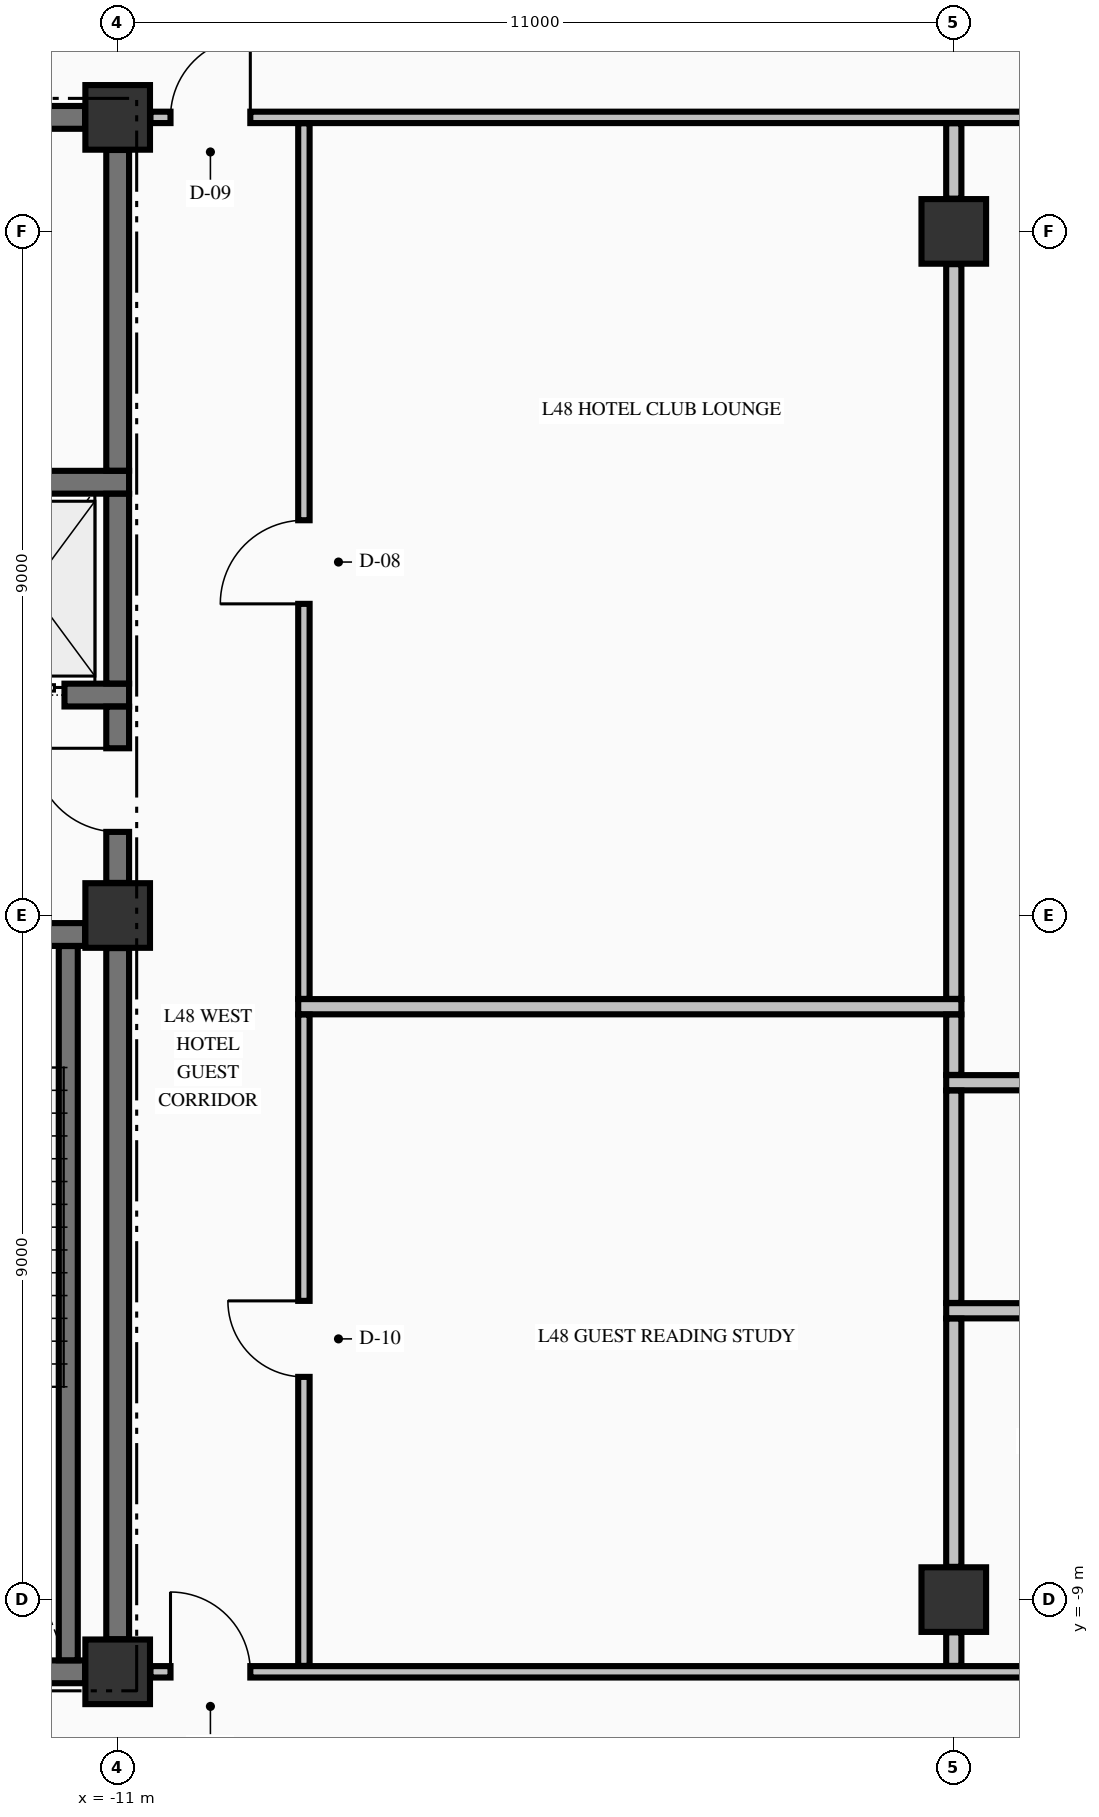
"""IFC4 building model, lengths in metres.
Left out: names, types, materials, properties, quantities, classifications, styles, units other than length and angle.
Written with IfcOpenShell. Run it as: python <this file> out.ifc"""

import sys

from ifc_helpers import new_model, si_unit, direction, frame, frame_2d, origin, origin_2d, place, context, subcontext, project, spatial, rectangle, extrude, element, fill, save


model = new_model("IFC4")
c1 = context("Model", 3, precision=1e-05, world=origin(), true_north=direction((0.0, 1.0)))
c2 = subcontext(c1, "Body", "Model", "MODEL_VIEW")
j1 = project(units=[si_unit("LENGTHUNIT", "METRE"), si_unit("PLANEANGLEUNIT", "RADIAN")], contexts=[c1])
p1 = place(None, origin())
s1 = spatial("IfcSite", under=j1, at=p1, CompositionType="ELEMENT")
p2 = place(p1, origin())
s2 = spatial("IfcBuilding", under=s1, at=p2, CompositionType="ELEMENT")
p3 = place(p2, frame((0.0, 0.0, 186.46)))
s3 = spatial("IfcBuildingStorey", under=s2, at=p3, CompositionType="ELEMENT", Elevation=186.46)
for number, where, z_axis, x_axis in (
    (1, (-11.0, -9.95, -0.425), (0.0, 0.0, 1.0), (1.0, 0.0, 0.0)),
    (2, (-11.0, 0.0, -0.425), (0.0, 0.0, 1.0), (1.0, 0.0, 0.0)),
    (3, (-11.0, 10.5, -0.425), (0.0, 0.0, 1.0), (1.0, 0.0, 0.0)),
    (4, (0.0, -9.0, -0.425), (0.0, 0.0, 1.0), (1.0, 0.0, 0.0)),
    (5, (0.0, 9.0, -0.425), (0.0, 0.0, 1.0), (1.0, 0.0, 0.0)),
):
    element("IfcColumn", number, at=place(p3, frame(where, z_axis=z_axis, x_axis=x_axis)), inside=s3, PredefinedType="COLUMN", context=c2, shape_type="SweptSolid", body=[
        extrude(rectangle(XDim=0.85, YDim=0.85, at=origin_2d()), origin(), (0.0, 0.0, 1.0), 5.0),
    ])
p4 = place(p3, frame((-14.7, -9.95, 0.0), z_axis=(0.0, 0.0, 1.0), x_axis=(1.0, 0.0, 0.0)))
e6 = element("IfcWall", 6, at=p4, inside=s3, PredefinedType="SHEAR", context=c2, shape_type="SweptSolid", body=[
    extrude(rectangle(XDim=3.271, YDim=0.3, at=frame_2d((1.635, 0.0))), origin(), (0.0, 0.0, 1.0), 4.575),
])
p5 = place(p3, frame((-19.571, -0.25, 0.0), z_axis=(0.0, 0.0, 1.0), x_axis=(1.0, 0.0, 0.0)))
e7 = element("IfcWall", 7, at=p5, inside=s3, PredefinedType="SHEAR", context=c2, shape_type="SweptSolid", body=[
    extrude(rectangle(XDim=8.142, YDim=0.3, at=frame_2d((4.071, 0.0))), origin(), (0.0, 0.0, 1.0), 4.575),
])
p6 = place(p5, frame((5.871, 0.0, 0.0)))
e8 = element("IfcOpeningElement", 8, at=p6, cuts=e7, PredefinedType="OPENING", context=c2, shape_type="SweptSolid", body=[
    extrude(rectangle(XDim=1.1, YDim=2.15, at=frame_2d((0.55, 1.075))), frame((0.0, 0.16, 0.0), z_axis=(0.0, -1.0, 0.0), x_axis=(1.0, 0.0, 0.0)), (0.0, 0.0, 1.0), 0.32),
])
p7 = place(p3, frame((-14.875, 2.9, 0.0), z_axis=(0.0, 0.0, 1.0), x_axis=(1.0, 0.0, 0.0)))
e9 = element("IfcWall", 9, at=p7, inside=s3, PredefinedType="SHEAR", context=c2, shape_type="SweptSolid", body=[
    extrude(rectangle(XDim=4.025, YDim=0.3, at=frame_2d((2.012, 0.0))), origin(), (0.0, 0.0, 1.0), 4.575),
])
p8 = place(p7, frame((2.075, 0.0, 0.0)))
e10 = element("IfcOpeningElement", 10, at=p8, cuts=e9, PredefinedType="OPENING", context=c2, shape_type="SweptSolid", body=[
    extrude(rectangle(XDim=1.1, YDim=2.2, at=frame_2d((0.55, 1.1))), frame((0.0, 0.16, 0.0), z_axis=(0.0, -1.0, 0.0), x_axis=(1.0, 0.0, 0.0)), (0.0, 0.0, 1.0), 0.32),
])
p9 = place(p3, frame((-14.875, 5.7, 0.0), z_axis=(0.0, 0.0, 1.0), x_axis=(1.0, 0.0, 0.0)))
e11 = element("IfcWall", 11, at=p9, inside=s3, PredefinedType="SHEAR", context=c2, shape_type="SweptSolid", body=[
    extrude(rectangle(XDim=4.025, YDim=0.3, at=frame_2d((2.012, 0.0))), origin(), (0.0, 0.0, 1.0), 4.575),
])
p10 = place(p3, frame((-14.7, 10.5, 0.0), z_axis=(0.0, 0.0, 1.0), x_axis=(1.0, 0.0, 0.0)))
e12 = element("IfcWall", 12, at=p10, inside=s3, PredefinedType="SHEAR", context=c2, shape_type="SweptSolid", body=[
    extrude(rectangle(XDim=3.271, YDim=0.3, at=frame_2d((1.635, 0.0))), origin(), (0.0, 0.0, 1.0), 4.575),
])
p11 = place(p10, frame((0.775, 0.0, 0.0)))
e13 = element("IfcOpeningElement", 13, at=p11, cuts=e12, PredefinedType="OPENING", context=c2, shape_type="SweptSolid", body=[
    extrude(rectangle(XDim=0.95, YDim=2.15, at=frame_2d((0.475, 1.075))), frame((0.0, 0.16, 0.0), z_axis=(0.0, -1.0, 0.0), x_axis=(1.0, 0.0, 0.0)), (0.0, 0.0, 1.0), 0.32),
])
p12 = place(p3, frame((-10.569, -9.95, 0.0), z_axis=(0.0, 0.0, 1.0), x_axis=(1.0, 0.0, 0.0)))
e14 = element("IfcWall", 14, at=p12, inside=s3, PredefinedType="PARTITIONING", context=c2, shape_type="SweptSolid", body=[
    extrude(rectangle(XDim=21.138, YDim=0.15, at=frame_2d((10.569, 0.0))), origin(), (0.0, 0.0, 1.0), 4.575),
])
p13 = place(p12, frame((0.264, 0.0, 0.0)))
e15 = element("IfcOpeningElement", 15, at=p13, cuts=e14, PredefinedType="OPENING", context=c2, shape_type="SweptSolid", body=[
    extrude(rectangle(XDim=1.05, YDim=2.15, at=frame_2d((0.525, 1.075))), frame((0.0, 0.085, 0.0), z_axis=(0.0, -1.0, 0.0), x_axis=(1.0, 0.0, 0.0)), (0.0, 0.0, 1.0), 0.17),
])
p14 = place(p12, frame((19.824, 0.0, 0.0)))
e16 = element("IfcOpeningElement", 16, at=p14, cuts=e14, PredefinedType="OPENING", context=c2, shape_type="SweptSolid", body=[
    extrude(rectangle(XDim=1.05, YDim=2.15, at=frame_2d((0.525, 1.075))), frame((0.0, 0.085, 0.0), z_axis=(0.0, -1.0, 0.0), x_axis=(1.0, 0.0, 0.0)), (0.0, 0.0, 1.0), 0.17),
])
p15 = place(p12, frame((12.874, 0.0, 0.0)))
e17 = element("IfcOpeningElement", 17, at=p15, cuts=e14, PredefinedType="OPENING", context=c2, shape_type="SweptSolid", body=[
    extrude(rectangle(XDim=0.95, YDim=2.15, at=frame_2d((0.475, 1.075))), frame((0.0, 0.085, 0.0), z_axis=(0.0, -1.0, 0.0), x_axis=(1.0, 0.0, 0.0)), (0.0, 0.0, 1.0), 0.17),
])
for number, where, z_axis, x_axis in (
    (18, (-0.1, -5.2, 0.0), (0.0, 0.0, 1.0), (1.0, 0.0, 0.0)),
    (19, (-0.1, -2.2, 0.0), (0.0, 0.0, 1.0), (1.0, 0.0, 0.0)),
    (20, (-8.625, -1.2, 0.0), (0.0, 0.0, 1.0), (1.0, 0.0, 0.0)),
):
    element("IfcWall", number, at=place(p3, frame(where, z_axis=z_axis, x_axis=x_axis)), inside=s3, PredefinedType="PARTITIONING", context=c2, shape_type="SweptSolid", body=[
        extrude(rectangle(XDim=8.725, YDim=0.2, at=frame_2d((4.363, 0.0))), origin(), (0.0, 0.0, 1.0), 4.575),
    ])
p16 = place(p3, frame((-10.569, 10.5, 0.0), z_axis=(0.0, 0.0, 1.0), x_axis=(1.0, 0.0, 0.0)))
e21 = element("IfcWall", 21, at=p16, inside=s3, PredefinedType="PARTITIONING", context=c2, shape_type="SweptSolid", body=[
    extrude(rectangle(XDim=21.138, YDim=0.15, at=frame_2d((10.569, 0.0))), origin(), (0.0, 0.0, 1.0), 4.575),
])
p17 = place(p16, frame((0.264, 0.0, 0.0)))
e22 = element("IfcOpeningElement", 22, at=p17, cuts=e21, PredefinedType="OPENING", context=c2, shape_type="SweptSolid", body=[
    extrude(rectangle(XDim=1.05, YDim=2.15, at=frame_2d((0.525, 1.075))), frame((0.0, 0.085, 0.0), z_axis=(0.0, -1.0, 0.0), x_axis=(1.0, 0.0, 0.0)), (0.0, 0.0, 1.0), 0.17),
])
p18 = place(p16, frame((19.824, 0.0, 0.0)))
e23 = element("IfcOpeningElement", 23, at=p18, cuts=e21, PredefinedType="OPENING", context=c2, shape_type="SweptSolid", body=[
    extrude(rectangle(XDim=1.05, YDim=2.15, at=frame_2d((0.525, 1.075))), frame((0.0, 0.085, 0.0), z_axis=(0.0, -1.0, 0.0), x_axis=(1.0, 0.0, 0.0)), (0.0, 0.0, 1.0), 0.17),
])
p19 = place(p3, frame((-11.65, -9.798, 0.0), z_axis=(0.0, 0.0, 1.0), x_axis=(0.0, 1.0, 0.0)))
e24 = element("IfcWall", 24, at=p19, inside=s3, PredefinedType="SOLIDWALL", context=c2, shape_type="SweptSolid", body=[
    extrude(rectangle(XDim=9.396, YDim=0.25, at=frame_2d((4.698, 0.0))), origin(), (0.0, 0.0, 1.0), 4.575),
])
p20 = place(p3, frame((-11.0, -9.521, 0.0), z_axis=(0.0, 0.0, 1.0), x_axis=(0.0, 1.0, 0.0)))
e25 = element("IfcWall", 25, at=p20, inside=s3, PredefinedType="SHEAR", context=c2, shape_type="SweptSolid", body=[
    extrude(rectangle(XDim=9.092, YDim=0.3, at=frame_2d((4.546, 0.0))), origin(), (0.0, 0.0, 1.0), 4.575),
])
p21 = place(p3, frame((-11.0, 0.429, 0.0), z_axis=(0.0, 0.0, 1.0), x_axis=(0.0, 1.0, 0.0)))
e26 = element("IfcWall", 26, at=p21, inside=s3, PredefinedType="SHEAR", context=c2, shape_type="SweptSolid", body=[
    extrude(rectangle(XDim=2.319, YDim=0.3, at=frame_2d((1.16, 0.0))), origin(), (0.0, 0.0, 1.0), 4.575),
])
p22 = place(p21, frame((0.671, 0.0, 0.0)))
e27 = element("IfcOpeningElement", 27, at=p22, cuts=e26, PredefinedType="OPENING", context=c2, shape_type="SweptSolid", body=[
    extrude(rectangle(XDim=1.1, YDim=2.15, at=frame_2d((0.55, 1.075))), frame((0.0, 0.16, 0.0), z_axis=(0.0, -1.0, 0.0), x_axis=(1.0, 0.0, 0.0)), (0.0, 0.0, 1.0), 0.32),
])
p23 = place(p3, frame((-11.0, 3.052, 0.0), z_axis=(0.0, 0.0, 1.0), x_axis=(0.0, 1.0, 0.0)))
e28 = element("IfcWall", 28, at=p23, inside=s3, PredefinedType="SHEAR", context=c2, shape_type="SweptSolid", body=[
    extrude(rectangle(XDim=2.496, YDim=0.3, at=frame_2d((1.248, 0.0))), origin(), (0.0, 0.0, 1.0), 4.575),
])
p24 = place(p3, frame((-11.0, 5.852, 0.0), z_axis=(0.0, 0.0, 1.0), x_axis=(0.0, 1.0, 0.0)))
e29 = element("IfcWall", 29, at=p24, inside=s3, PredefinedType="SHEAR", context=c2, shape_type="SweptSolid", body=[
    extrude(rectangle(XDim=4.219, YDim=0.3, at=frame_2d((2.109, 0.0))), origin(), (0.0, 0.0, 1.0), 4.575),
])
p25 = place(p3, frame((-8.55, -9.872, 0.0), z_axis=(0.0, 0.0, 1.0), x_axis=(0.0, 1.0, 0.0)))
e30 = element("IfcWall", 30, at=p25, inside=s3, PredefinedType="PARTITIONING", context=c2, shape_type="SweptSolid", body=[
    extrude(rectangle(XDim=8.569, YDim=0.15, at=frame_2d((4.285, 0.0))), origin(), (0.0, 0.0, 1.0), 4.575),
])
p26 = place(p25, frame((3.802, 0.0, 0.0)))
e31 = element("IfcOpeningElement", 31, at=p26, cuts=e30, PredefinedType="OPENING", context=c2, shape_type="SweptSolid", body=[
    extrude(rectangle(XDim=1.0, YDim=2.15, at=frame_2d((0.5, 1.075))), frame((0.0, 0.085, 0.0), z_axis=(0.0, -1.0, 0.0), x_axis=(1.0, 0.0, 0.0)), (0.0, 0.0, 1.0), 0.17),
])
p27 = place(p3, frame((-8.55, -1.097, 0.0), z_axis=(0.0, 0.0, 1.0), x_axis=(0.0, 1.0, 0.0)))
e32 = element("IfcWall", 32, at=p27, inside=s3, PredefinedType="PARTITIONING", context=c2, shape_type="SweptSolid", body=[
    extrude(rectangle(XDim=11.519, YDim=0.15, at=frame_2d((5.76, 0.0))), origin(), (0.0, 0.0, 1.0), 4.575),
])
p28 = place(p27, frame((5.197, 0.0, 0.0)))
e33 = element("IfcOpeningElement", 33, at=p28, cuts=e32, PredefinedType="OPENING", context=c2, shape_type="SweptSolid", body=[
    extrude(rectangle(XDim=1.1, YDim=2.15, at=frame_2d((0.55, 1.075))), frame((0.0, 0.085, 0.0), z_axis=(0.0, -1.0, 0.0), x_axis=(1.0, 0.0, 0.0)), (0.0, 0.0, 1.0), 0.17),
])
p29 = place(p3, frame((0.0, -9.872, 0.0), z_axis=(0.0, 0.0, 1.0), x_axis=(0.0, 1.0, 0.0)))
e34 = element("IfcWall", 34, at=p29, inside=s3, PredefinedType="PARTITIONING", context=c2, shape_type="SweptSolid", body=[
    extrude(rectangle(XDim=0.441, YDim=0.2, at=frame_2d((0.221, 0.0))), origin(), (0.0, 0.0, 1.0), 2.167),
])
p30 = place(p3, frame((0.0, -8.569, 0.0), z_axis=(0.0, 0.0, 1.0), x_axis=(0.0, 1.0, 0.0)))
e35 = element("IfcWall", 35, at=p30, inside=s3, PredefinedType="PARTITIONING", context=c2, shape_type="SweptSolid", body=[
    extrude(rectangle(XDim=3.266, YDim=0.2, at=frame_2d((1.633, 0.0))), origin(), (0.0, 0.0, 1.0), 3.767),
])
p31 = place(p3, frame((0.0, -5.097, 0.0), z_axis=(0.0, 0.0, 1.0), x_axis=(0.0, 1.0, 0.0)))
e36 = element("IfcWall", 36, at=p31, inside=s3, PredefinedType="PARTITIONING", context=c2, shape_type="SweptSolid", body=[
    extrude(rectangle(XDim=2.794, YDim=0.2, at=frame_2d((1.397, 0.0))), origin(), (0.0, 0.0, 1.0), 3.767),
])
p32 = place(p3, frame((0.0, -2.097, 0.0), z_axis=(0.0, 0.0, 1.0), x_axis=(0.0, 1.0, 0.0)))
e37 = element("IfcWall", 37, at=p32, inside=s3, PredefinedType="PARTITIONING", context=c2, shape_type="SweptSolid", body=[
    extrude(rectangle(XDim=0.794, YDim=0.2, at=frame_2d((0.397, 0.0))), origin(), (0.0, 0.0, 1.0), 3.767),
])
p33 = place(p3, frame((0.0, -1.097, 0.0), z_axis=(0.0, 0.0, 1.0), x_axis=(0.0, 1.0, 0.0)))
e38 = element("IfcWall", 38, at=p33, inside=s3, PredefinedType="PARTITIONING", context=c2, shape_type="SweptSolid", body=[
    extrude(rectangle(XDim=9.666, YDim=0.2, at=frame_2d((4.833, 0.0))), origin(), (0.0, 0.0, 1.0), 3.767),
])
p34 = place(p3, frame((0.0, 9.431, 0.0), z_axis=(0.0, 0.0, 1.0), x_axis=(0.0, 1.0, 0.0)))
e39 = element("IfcWall", 39, at=p34, inside=s3, PredefinedType="PARTITIONING", context=c2, shape_type="SweptSolid", body=[
    extrude(rectangle(XDim=0.991, YDim=0.2, at=frame_2d((0.496, 0.0))), origin(), (0.0, 0.0, 1.0), 2.167),
])
p35 = place(p22, origin())
e40 = element("IfcDoor", 40, at=p35, inside=s3, OperationType="SINGLE_SWING_RIGHT", PredefinedType="DOOR", context=c2, shape_type="SweptSolid", body=[
    extrude(rectangle(XDim=1.1, YDim=2.15, at=frame_2d((0.55, 1.075))), frame((0.0, 0.025, 0.0), z_axis=(0.0, -1.0, 0.0), x_axis=(1.0, 0.0, 0.0)), (0.0, 0.0, 1.0), 0.05),
])
fill(e27, e40)
p36 = place(p8, origin())
e41 = element("IfcDoor", 41, at=p36, inside=s3, OperationType="SLIDING_TO_LEFT", PredefinedType="DOOR", context=c2, shape_type="SweptSolid", body=[
    extrude(rectangle(XDim=1.1, YDim=2.2, at=frame_2d((0.55, 1.1))), frame((0.0, 0.025, 0.0), z_axis=(0.0, -1.0, 0.0), x_axis=(1.0, 0.0, 0.0)), (0.0, 0.0, 1.0), 0.05),
])
fill(e10, e41)
p37 = place(p17, origin())
e42 = element("IfcDoor", 42, at=p37, inside=s3, OperationType="SINGLE_SWING_RIGHT", PredefinedType="DOOR", context=c2, shape_type="SweptSolid", body=[
    extrude(rectangle(XDim=1.05, YDim=2.15, at=frame_2d((0.525, 1.075))), frame((0.0, 0.025, 0.0), z_axis=(0.0, -1.0, 0.0), x_axis=(1.0, 0.0, 0.0)), (0.0, 0.0, 1.0), 0.05),
])
fill(e22, e42)
p38 = place(p13, origin())
e43 = element("IfcDoor", 43, at=p38, inside=s3, OperationType="SINGLE_SWING_LEFT", PredefinedType="DOOR", context=c2, shape_type="SweptSolid", body=[
    extrude(rectangle(XDim=1.05, YDim=2.15, at=frame_2d((0.525, 1.075))), frame((0.0, 0.025, 0.0), z_axis=(0.0, -1.0, 0.0), x_axis=(1.0, 0.0, 0.0)), (0.0, 0.0, 1.0), 0.05),
])
fill(e15, e43)
p39 = place(p28, origin())
e44 = element("IfcDoor", 44, at=p39, inside=s3, OperationType="SINGLE_SWING_LEFT", PredefinedType="DOOR", context=c2, shape_type="SweptSolid", body=[
    extrude(rectangle(XDim=1.1, YDim=2.15, at=frame_2d((0.55, 1.075))), frame((0.0, 0.025, 0.0), z_axis=(0.0, -1.0, 0.0), x_axis=(1.0, 0.0, 0.0)), (0.0, 0.0, 1.0), 0.05),
])
fill(e33, e44)
p40 = place(p26, origin())
e45 = element("IfcDoor", 45, at=p40, inside=s3, OperationType="SINGLE_SWING_RIGHT", PredefinedType="DOOR", context=c2, shape_type="SweptSolid", body=[
    extrude(rectangle(XDim=1.0, YDim=2.15, at=frame_2d((0.5, 1.075))), frame((0.0, 0.025, 0.0), z_axis=(0.0, -1.0, 0.0), x_axis=(1.0, 0.0, 0.0)), (0.0, 0.0, 1.0), 0.05),
])
fill(e31, e45)
save(model, sys.argv[1])
